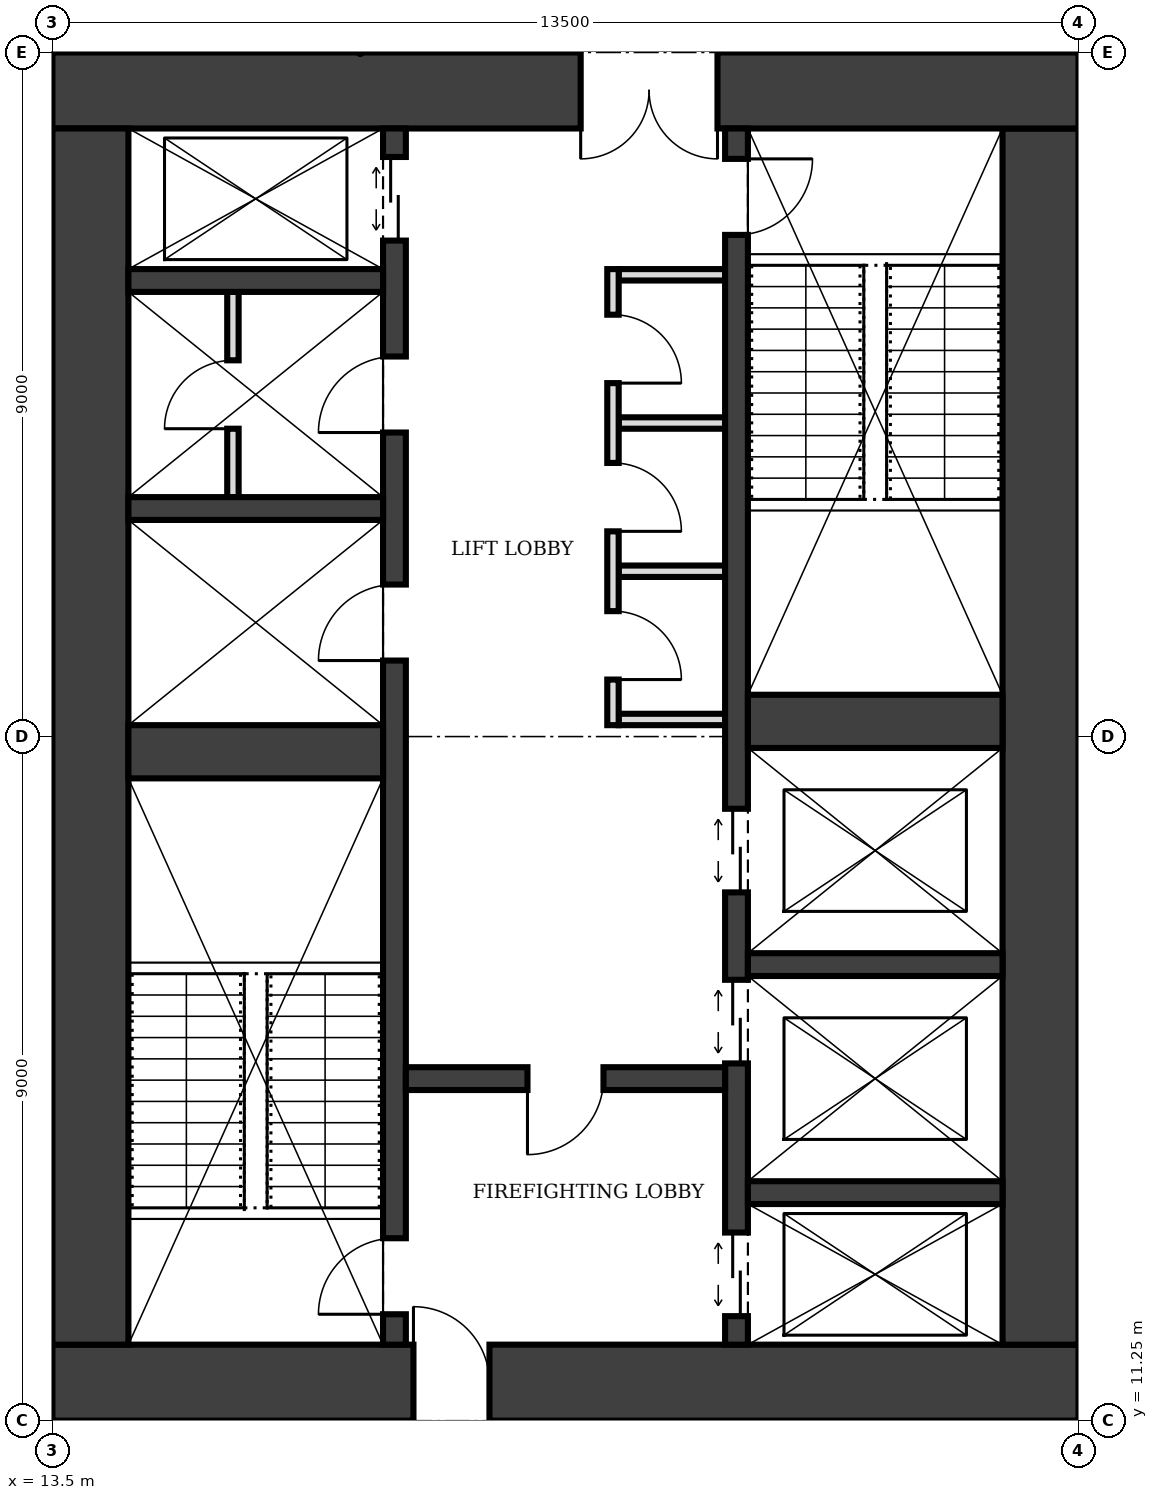
"""IFC4 building model, lengths in metres.
Left out: names, types, materials, properties, quantities, classifications, styles, units other than length and angle.
Written with IfcOpenShell. Run it as: python <this file> out.ifc"""

import sys

from ifc_helpers import new_model, si_unit, direction, frame, frame_2d, origin, place, context, subcontext, project, spatial, rectangle, extrude, element, fill, save


model = new_model("IFC4")
c1 = context("Model", 3, precision=1e-05, world=origin(), true_north=direction((0.0, 1.0)))
c2 = subcontext(c1, "Body", "Model", "MODEL_VIEW")
j1 = project(units=[si_unit("LENGTHUNIT", "METRE"), si_unit("PLANEANGLEUNIT", "RADIAN")], contexts=[c1])
p1 = place(None, origin())
s1 = spatial("IfcSite", under=j1, at=p1, CompositionType="ELEMENT")
p2 = place(p1, origin())
s2 = spatial("IfcBuilding", under=s1, at=p2, CompositionType="ELEMENT")
p3 = place(p2, frame((0.0, 0.0, 217.0)))
s3 = spatial("IfcBuildingStorey", under=s2, at=p3, CompositionType="ELEMENT", Elevation=217.0)
p4 = place(p3, frame((13.5, 11.75, 0.0), z_axis=(0.0, 0.0, 1.0), x_axis=(1.0, 0.0, 0.0)))
e1 = element("IfcWall", 1, at=p4, inside=s3, PredefinedType="SHEAR", context=c2, shape_type="SweptSolid", body=[
    extrude(rectangle(XDim=13.5, YDim=1.0, at=frame_2d((6.75, 0.0))), origin(), (0.0, 0.0, 1.0), 4.0),
])
p5 = place(p4, frame((4.75, 0.0, 0.0)))
e2 = element("IfcOpeningElement", 2, at=p5, cuts=e1, PredefinedType="OPENING", context=c2, shape_type="SweptSolid", body=[
    extrude(rectangle(XDim=1.0, YDim=2.1, at=frame_2d((0.5, 1.05))), frame((0.0, 0.51, 0.0), z_axis=(0.0, -1.0, 0.0), x_axis=(1.0, 0.0, 0.0)), (0.0, 0.0, 1.0), 1.02),
])
p6 = place(p3, frame((26.5, 12.25, 0.0), z_axis=(0.0, 0.0, 1.0), x_axis=(0.0, 1.0, 0.0)))
e3 = element("IfcWall", 3, at=p6, inside=s3, PredefinedType="SHEAR", context=c2, shape_type="SweptSolid", body=[
    extrude(rectangle(XDim=16.0, YDim=1.0, at=frame_2d((8.0, 0.0))), origin(), (0.0, 0.0, 1.0), 4.0),
])
p7 = place(p3, frame((27.0, 28.75, 0.0), z_axis=(0.0, 0.0, 1.0), x_axis=(-1.0, 0.0, 0.0)))
e4 = element("IfcWall", 4, at=p7, inside=s3, PredefinedType="SHEAR", context=c2, shape_type="SweptSolid", body=[
    extrude(rectangle(XDim=13.5, YDim=1.0, at=frame_2d((6.75, 0.0))), origin(), (0.0, 0.0, 1.0), 4.0),
])
p8 = place(p7, frame((4.75, 0.0, 0.0)))
e5 = element("IfcOpeningElement", 5, at=p8, cuts=e4, PredefinedType="OPENING", context=c2, shape_type="SweptSolid", body=[
    extrude(rectangle(XDim=1.8, YDim=2.1, at=frame_2d((0.9, 1.05))), frame((0.0, 0.51, 0.0), z_axis=(0.0, -1.0, 0.0), x_axis=(1.0, 0.0, 0.0)), (0.0, 0.0, 1.0), 1.02),
])
p9 = place(p3, frame((14.0, 28.25, 0.0), z_axis=(0.0, 0.0, 1.0), x_axis=(0.0, -1.0, 0.0)))
e6 = element("IfcWall", 6, at=p9, inside=s3, PredefinedType="SHEAR", context=c2, shape_type="SweptSolid", body=[
    extrude(rectangle(XDim=16.0, YDim=1.0, at=frame_2d((8.0, 0.0))), origin(), (0.0, 0.0, 1.0), 4.0),
])
p10 = place(p3, frame((18.0, 12.25, 0.0), z_axis=(0.0, 0.0, 1.0), x_axis=(0.0, 1.0, 0.0)))
e7 = element("IfcWall", 7, at=p10, inside=s3, PredefinedType="SHEAR", context=c2, shape_type="SweptSolid", body=[
    extrude(rectangle(XDim=16.0, YDim=0.3, at=frame_2d((8.0, 0.0))), origin(), (0.0, 0.0, 1.0), 4.0),
])
p11 = place(p10, frame((0.4, 0.0, 0.0)))
e8 = element("IfcOpeningElement", 8, at=p11, cuts=e7, PredefinedType="OPENING", context=c2, shape_type="SweptSolid", body=[
    extrude(rectangle(XDim=1.0, YDim=2.1, at=frame_2d((0.5, 1.05))), frame((0.0, 0.16, 0.0), z_axis=(0.0, -1.0, 0.0), x_axis=(1.0, 0.0, 0.0)), (0.0, 0.0, 1.0), 0.32),
])
p12 = place(p10, frame((14.525, 0.0, 0.0)))
e9 = element("IfcOpeningElement", 9, at=p12, cuts=e7, PredefinedType="OPENING", context=c2, shape_type="SweptSolid", body=[
    extrude(rectangle(XDim=1.1, YDim=2.1, at=frame_2d((0.55, 1.05))), frame((0.0, 0.16, 0.0), z_axis=(0.0, -1.0, 0.0), x_axis=(1.0, 0.0, 0.0)), (0.0, 0.0, 1.0), 0.32),
])
p13 = place(p10, frame((9.0, 0.0, 0.0)))
e10 = element("IfcOpeningElement", 10, at=p13, cuts=e7, PredefinedType="OPENING", context=c2, shape_type="SweptSolid", body=[
    extrude(rectangle(XDim=1.0, YDim=2.1, at=frame_2d((0.5, 1.05))), frame((0.0, 0.16, 0.0), z_axis=(0.0, -1.0, 0.0), x_axis=(1.0, 0.0, 0.0)), (0.0, 0.0, 1.0), 0.32),
])
p14 = place(p10, frame((12.0, 0.0, 0.0)))
e11 = element("IfcOpeningElement", 11, at=p14, cuts=e7, PredefinedType="OPENING", context=c2, shape_type="SweptSolid", body=[
    extrude(rectangle(XDim=1.0, YDim=2.1, at=frame_2d((0.5, 1.05))), frame((0.0, 0.16, 0.0), z_axis=(0.0, -1.0, 0.0), x_axis=(1.0, 0.0, 0.0)), (0.0, 0.0, 1.0), 0.32),
])
p15 = place(p3, frame((22.5, 12.25, 0.0), z_axis=(0.0, 0.0, 1.0), x_axis=(0.0, 1.0, 0.0)))
e12 = element("IfcWall", 12, at=p15, inside=s3, PredefinedType="SHEAR", context=c2, shape_type="SweptSolid", body=[
    extrude(rectangle(XDim=16.0, YDim=0.3, at=frame_2d((8.0, 0.0))), origin(), (0.0, 0.0, 1.0), 4.0),
])
p16 = place(p15, frame((14.6, 0.0, 0.0)))
e13 = element("IfcOpeningElement", 13, at=p16, cuts=e12, PredefinedType="OPENING", context=c2, shape_type="SweptSolid", body=[
    extrude(rectangle(XDim=1.0, YDim=2.1, at=frame_2d((0.5, 1.05))), frame((0.0, 0.16, 0.0), z_axis=(0.0, -1.0, 0.0), x_axis=(1.0, 0.0, 0.0)), (0.0, 0.0, 1.0), 0.32),
])
p17 = place(p15, frame((0.375, 0.0, 0.0)))
e14 = element("IfcOpeningElement", 14, at=p17, cuts=e12, PredefinedType="OPENING", context=c2, shape_type="SweptSolid", body=[
    extrude(rectangle(XDim=1.1, YDim=2.1, at=frame_2d((0.55, 1.05))), frame((0.0, 0.16, 0.0), z_axis=(0.0, -1.0, 0.0), x_axis=(1.0, 0.0, 0.0)), (0.0, 0.0, 1.0), 0.32),
])
p18 = place(p15, frame((3.7, 0.0, 0.0)))
e15 = element("IfcOpeningElement", 15, at=p18, cuts=e12, PredefinedType="OPENING", context=c2, shape_type="SweptSolid", body=[
    extrude(rectangle(XDim=1.1, YDim=2.1, at=frame_2d((0.55, 1.05))), frame((0.0, 0.16, 0.0), z_axis=(0.0, -1.0, 0.0), x_axis=(1.0, 0.0, 0.0)), (0.0, 0.0, 1.0), 0.32),
])
p19 = place(p15, frame((5.95, 0.0, 0.0)))
e16 = element("IfcOpeningElement", 16, at=p19, cuts=e12, PredefinedType="OPENING", context=c2, shape_type="SweptSolid", body=[
    extrude(rectangle(XDim=1.1, YDim=2.1, at=frame_2d((0.55, 1.05))), frame((0.0, 0.16, 0.0), z_axis=(0.0, -1.0, 0.0), x_axis=(1.0, 0.0, 0.0)), (0.0, 0.0, 1.0), 0.32),
])
p20 = place(p3, frame((14.5, 20.05, 0.0), z_axis=(0.0, 0.0, 1.0), x_axis=(1.0, 0.0, 0.0)))
e17 = element("IfcWall", 17, at=p20, inside=s3, PredefinedType="SHEAR", context=c2, shape_type="SweptSolid", body=[
    extrude(rectangle(XDim=3.35, YDim=0.7, at=frame_2d((1.675, 0.0))), origin(), (0.0, 0.0, 1.0), 4.0),
])
p21 = place(p3, frame((18.15, 15.75, 0.0), z_axis=(0.0, 0.0, 1.0), x_axis=(1.0, 0.0, 0.0)))
e18 = element("IfcWall", 18, at=p21, inside=s3, PredefinedType="SHEAR", context=c2, shape_type="SweptSolid", body=[
    extrude(rectangle(XDim=4.2, YDim=0.3, at=frame_2d((2.1, 0.0))), origin(), (0.0, 0.0, 1.0), 4.0),
])
p22 = place(p21, frame((1.6, 0.0, 0.0)))
e19 = element("IfcOpeningElement", 19, at=p22, cuts=e18, PredefinedType="OPENING", context=c2, shape_type="SweptSolid", body=[
    extrude(rectangle(XDim=1.0, YDim=2.1, at=frame_2d((0.5, 1.05))), frame((0.0, 0.16, 0.0), z_axis=(0.0, -1.0, 0.0), x_axis=(1.0, 0.0, 0.0)), (0.0, 0.0, 1.0), 0.32),
])
for number, where, z_axis, x_axis in (
    (20, (22.65, 14.25, 0.0), (0.0, 0.0, 1.0), (1.0, 0.0, 0.0)),
    (21, (22.65, 17.25, 0.0), (0.0, 0.0, 1.0), (1.0, 0.0, 0.0)),
):
    element("IfcWall", number, at=place(p3, frame(where, z_axis=z_axis, x_axis=x_axis)), inside=s3, PredefinedType="SHEAR", context=c2, shape_type="SweptSolid", body=[
        extrude(rectangle(XDim=3.35, YDim=0.3, at=frame_2d((1.675, 0.0))), origin(), (0.0, 0.0, 1.0), 4.0),
    ])
p23 = place(p3, frame((22.65, 20.45, 0.0), z_axis=(0.0, 0.0, 1.0), x_axis=(1.0, 0.0, 0.0)))
e22 = element("IfcWall", 22, at=p23, inside=s3, PredefinedType="SHEAR", context=c2, shape_type="SweptSolid", body=[
    extrude(rectangle(XDim=3.35, YDim=0.7, at=frame_2d((1.675, 0.0))), origin(), (0.0, 0.0, 1.0), 4.0),
])
for number, where, z_axis, x_axis in (
    (23, (14.5, 23.25, 0.0), (0.0, 0.0, 1.0), (1.0, 0.0, 0.0)),
    (24, (14.5, 26.25, 0.0), (0.0, 0.0, 1.0), (1.0, 0.0, 0.0)),
):
    element("IfcWall", number, at=place(p3, frame(where, z_axis=z_axis, x_axis=x_axis)), inside=s3, PredefinedType="SHEAR", context=c2, shape_type="SweptSolid", body=[
        extrude(rectangle(XDim=3.35, YDim=0.3, at=frame_2d((1.675, 0.0))), origin(), (0.0, 0.0, 1.0), 4.0),
    ])
p24 = place(p3, frame((20.875, 20.4, 0.0), z_axis=(0.0, 0.0, 1.0), x_axis=(0.0, 1.0, 0.0)))
e25 = element("IfcWall", 25, at=p24, inside=s3, PredefinedType="PARTITIONING", context=c2, shape_type="SweptSolid", body=[
    extrude(rectangle(XDim=6.0, YDim=0.15, at=frame_2d((3.0, 0.0))), origin(), (0.0, 0.0, 1.0), 3.75),
])
p25 = place(p24, frame((0.6, 0.0, 0.0)))
e26 = element("IfcOpeningElement", 26, at=p25, cuts=e25, PredefinedType="OPENING", context=c2, shape_type="SweptSolid", body=[
    extrude(rectangle(XDim=0.9, YDim=2.1, at=frame_2d((0.45, 1.05))), frame((0.0, 0.085, 0.0), z_axis=(0.0, -1.0, 0.0), x_axis=(1.0, 0.0, 0.0)), (0.0, 0.0, 1.0), 0.17),
])
p26 = place(p24, frame((2.55, 0.0, 0.0)))
e27 = element("IfcOpeningElement", 27, at=p26, cuts=e25, PredefinedType="OPENING", context=c2, shape_type="SweptSolid", body=[
    extrude(rectangle(XDim=0.9, YDim=2.1, at=frame_2d((0.45, 1.05))), frame((0.0, 0.085, 0.0), z_axis=(0.0, -1.0, 0.0), x_axis=(1.0, 0.0, 0.0)), (0.0, 0.0, 1.0), 0.17),
])
p27 = place(p24, frame((4.5, 0.0, 0.0)))
e28 = element("IfcOpeningElement", 28, at=p27, cuts=e25, PredefinedType="OPENING", context=c2, shape_type="SweptSolid", body=[
    extrude(rectangle(XDim=0.9, YDim=2.1, at=frame_2d((0.45, 1.05))), frame((0.0, 0.085, 0.0), z_axis=(0.0, -1.0, 0.0), x_axis=(1.0, 0.0, 0.0)), (0.0, 0.0, 1.0), 0.17),
])
for number, where, z_axis, x_axis in (
    (29, (20.95, 20.475, 0.0), (0.0, 0.0, 1.0), (1.0, 0.0, 0.0)),
    (30, (20.95, 22.425, 0.0), (0.0, 0.0, 1.0), (1.0, 0.0, 0.0)),
    (31, (20.95, 24.375, 0.0), (0.0, 0.0, 1.0), (1.0, 0.0, 0.0)),
    (32, (20.95, 26.325, 0.0), (0.0, 0.0, 1.0), (1.0, 0.0, 0.0)),
):
    element("IfcWall", number, at=place(p3, frame(where, z_axis=z_axis, x_axis=x_axis)), inside=s3, PredefinedType="PARTITIONING", context=c2, shape_type="SweptSolid", body=[
        extrude(rectangle(XDim=1.4, YDim=0.15, at=frame_2d((0.7, 0.0))), origin(), (0.0, 0.0, 1.0), 3.75),
    ])
p28 = place(p3, frame((15.875, 23.4, 0.0), z_axis=(0.0, 0.0, 1.0), x_axis=(0.0, 1.0, 0.0)))
e33 = element("IfcWall", 33, at=p28, inside=s3, PredefinedType="PARTITIONING", context=c2, shape_type="SweptSolid", body=[
    extrude(rectangle(XDim=2.7, YDim=0.15, at=frame_2d((1.35, 0.0))), origin(), (0.0, 0.0, 1.0), 3.75),
])
p29 = place(p28, frame((0.9, 0.0, 0.0)))
e34 = element("IfcOpeningElement", 34, at=p29, cuts=e33, PredefinedType="OPENING", context=c2, shape_type="SweptSolid", body=[
    extrude(rectangle(XDim=0.9, YDim=2.1, at=frame_2d((0.45, 1.05))), frame((0.0, 0.085, 0.0), z_axis=(0.0, -1.0, 0.0), x_axis=(1.0, 0.0, 0.0)), (0.0, 0.0, 1.0), 0.17),
])
p30 = place(p5, origin())
e35 = element("IfcDoor", 35, at=p30, inside=s3, OperationType="SINGLE_SWING_LEFT", PredefinedType="DOOR", context=c2, shape_type="SweptSolid", body=[
    extrude(rectangle(XDim=1.0, YDim=2.1, at=frame_2d((0.5, 1.05))), frame((0.0, 0.025, 0.0), z_axis=(0.0, -1.0, 0.0), x_axis=(1.0, 0.0, 0.0)), (0.0, 0.0, 1.0), 0.05),
])
fill(e2, e35)
p31 = place(p8, origin())
e36 = element("IfcDoor", 36, at=p31, inside=s3, OperationType="DOUBLE_DOOR_SINGLE_SWING", PredefinedType="DOOR", context=c2, shape_type="SweptSolid", body=[
    extrude(rectangle(XDim=1.8, YDim=2.1, at=frame_2d((0.9, 1.05))), frame((0.0, 0.025, 0.0), z_axis=(0.0, -1.0, 0.0), x_axis=(1.0, 0.0, 0.0)), (0.0, 0.0, 1.0), 0.05),
])
fill(e5, e36)
p32 = place(p22, frame((1.0, 0.0, 0.0), z_axis=(0.0, 0.0, 1.0), x_axis=(-1.0, 0.0, 0.0)))
e37 = element("IfcDoor", 37, at=p32, inside=s3, OperationType="SINGLE_SWING_RIGHT", PredefinedType="DOOR", context=c2, shape_type="SweptSolid", body=[
    extrude(rectangle(XDim=1.0, YDim=2.1, at=frame_2d((0.5, 1.05))), frame((0.0, 0.025, 0.0), z_axis=(0.0, -1.0, 0.0), x_axis=(1.0, 0.0, 0.0)), (0.0, 0.0, 1.0), 0.05),
])
fill(e19, e37)
p33 = place(p11, origin())
e38 = element("IfcDoor", 38, at=p33, inside=s3, OperationType="SINGLE_SWING_LEFT", PredefinedType="DOOR", context=c2, shape_type="SweptSolid", body=[
    extrude(rectangle(XDim=1.0, YDim=2.1, at=frame_2d((0.5, 1.05))), frame((0.0, 0.025, 0.0), z_axis=(0.0, -1.0, 0.0), x_axis=(1.0, 0.0, 0.0)), (0.0, 0.0, 1.0), 0.05),
])
fill(e8, e38)
p34 = place(p16, frame((1.0, 0.0, 0.0), z_axis=(0.0, 0.0, 1.0), x_axis=(-1.0, 0.0, 0.0)))
e39 = element("IfcDoor", 39, at=p34, inside=s3, OperationType="SINGLE_SWING_LEFT", PredefinedType="DOOR", context=c2, shape_type="SweptSolid", body=[
    extrude(rectangle(XDim=1.0, YDim=2.1, at=frame_2d((0.5, 1.05))), frame((0.0, 0.025, 0.0), z_axis=(0.0, -1.0, 0.0), x_axis=(1.0, 0.0, 0.0)), (0.0, 0.0, 1.0), 0.05),
])
fill(e13, e39)
p35 = place(p17, origin())
e40 = element("IfcDoor", 40, at=p35, inside=s3, OperationType="DOUBLE_DOOR_SLIDING", PredefinedType="DOOR", context=c2, shape_type="SweptSolid", body=[
    extrude(rectangle(XDim=1.1, YDim=2.1, at=frame_2d((0.55, 1.05))), frame((0.0, 0.025, 0.0), z_axis=(0.0, -1.0, 0.0), x_axis=(1.0, 0.0, 0.0)), (0.0, 0.0, 1.0), 0.05),
])
fill(e14, e40)
p36 = place(p12, origin())
e41 = element("IfcDoor", 41, at=p36, inside=s3, OperationType="DOUBLE_DOOR_SLIDING", PredefinedType="DOOR", context=c2, shape_type="SweptSolid", body=[
    extrude(rectangle(XDim=1.1, YDim=2.1, at=frame_2d((0.55, 1.05))), frame((0.0, 0.025, 0.0), z_axis=(0.0, -1.0, 0.0), x_axis=(1.0, 0.0, 0.0)), (0.0, 0.0, 1.0), 0.05),
])
fill(e9, e41)
p37 = place(p18, origin())
e42 = element("IfcDoor", 42, at=p37, inside=s3, OperationType="DOUBLE_DOOR_SLIDING", PredefinedType="DOOR", context=c2, shape_type="SweptSolid", body=[
    extrude(rectangle(XDim=1.1, YDim=2.1, at=frame_2d((0.55, 1.05))), frame((0.0, 0.025, 0.0), z_axis=(0.0, -1.0, 0.0), x_axis=(1.0, 0.0, 0.0)), (0.0, 0.0, 1.0), 0.05),
])
fill(e15, e42)
p38 = place(p19, origin())
e43 = element("IfcDoor", 43, at=p38, inside=s3, OperationType="DOUBLE_DOOR_SLIDING", PredefinedType="DOOR", context=c2, shape_type="SweptSolid", body=[
    extrude(rectangle(XDim=1.1, YDim=2.1, at=frame_2d((0.55, 1.05))), frame((0.0, 0.025, 0.0), z_axis=(0.0, -1.0, 0.0), x_axis=(1.0, 0.0, 0.0)), (0.0, 0.0, 1.0), 0.05),
])
fill(e16, e43)
p39 = place(p25, frame((0.9, 0.0, 0.0), z_axis=(0.0, 0.0, 1.0), x_axis=(-1.0, 0.0, 0.0)))
e44 = element("IfcDoor", 44, at=p39, inside=s3, OperationType="SINGLE_SWING_RIGHT", PredefinedType="DOOR", context=c2, shape_type="SweptSolid", body=[
    extrude(rectangle(XDim=0.9, YDim=2.1, at=frame_2d((0.45, 1.05))), frame((0.0, 0.025, 0.0), z_axis=(0.0, -1.0, 0.0), x_axis=(1.0, 0.0, 0.0)), (0.0, 0.0, 1.0), 0.05),
])
fill(e26, e44)
p40 = place(p26, frame((0.9, 0.0, 0.0), z_axis=(0.0, 0.0, 1.0), x_axis=(-1.0, 0.0, 0.0)))
e45 = element("IfcDoor", 45, at=p40, inside=s3, OperationType="SINGLE_SWING_RIGHT", PredefinedType="DOOR", context=c2, shape_type="SweptSolid", body=[
    extrude(rectangle(XDim=0.9, YDim=2.1, at=frame_2d((0.45, 1.05))), frame((0.0, 0.025, 0.0), z_axis=(0.0, -1.0, 0.0), x_axis=(1.0, 0.0, 0.0)), (0.0, 0.0, 1.0), 0.05),
])
fill(e27, e45)
p41 = place(p27, frame((0.9, 0.0, 0.0), z_axis=(0.0, 0.0, 1.0), x_axis=(-1.0, 0.0, 0.0)))
e46 = element("IfcDoor", 46, at=p41, inside=s3, OperationType="SINGLE_SWING_RIGHT", PredefinedType="DOOR", context=c2, shape_type="SweptSolid", body=[
    extrude(rectangle(XDim=0.9, YDim=2.1, at=frame_2d((0.45, 1.05))), frame((0.0, 0.025, 0.0), z_axis=(0.0, -1.0, 0.0), x_axis=(1.0, 0.0, 0.0)), (0.0, 0.0, 1.0), 0.05),
])
fill(e28, e46)
p42 = place(p13, origin())
e47 = element("IfcDoor", 47, at=p42, inside=s3, OperationType="SINGLE_SWING_LEFT", PredefinedType="DOOR", context=c2, shape_type="SweptSolid", body=[
    extrude(rectangle(XDim=1.0, YDim=2.1, at=frame_2d((0.5, 1.05))), frame((0.0, 0.025, 0.0), z_axis=(0.0, -1.0, 0.0), x_axis=(1.0, 0.0, 0.0)), (0.0, 0.0, 1.0), 0.05),
])
fill(e10, e47)
p43 = place(p14, origin())
e48 = element("IfcDoor", 48, at=p43, inside=s3, OperationType="SINGLE_SWING_LEFT", PredefinedType="DOOR", context=c2, shape_type="SweptSolid", body=[
    extrude(rectangle(XDim=1.0, YDim=2.1, at=frame_2d((0.5, 1.05))), frame((0.0, 0.025, 0.0), z_axis=(0.0, -1.0, 0.0), x_axis=(1.0, 0.0, 0.0)), (0.0, 0.0, 1.0), 0.05),
])
fill(e11, e48)
p44 = place(p29, origin())
e49 = element("IfcDoor", 49, at=p44, inside=s3, OperationType="SINGLE_SWING_LEFT", PredefinedType="DOOR", context=c2, shape_type="SweptSolid", body=[
    extrude(rectangle(XDim=0.9, YDim=2.1, at=frame_2d((0.45, 1.05))), frame((0.0, 0.025, 0.0), z_axis=(0.0, -1.0, 0.0), x_axis=(1.0, 0.0, 0.0)), (0.0, 0.0, 1.0), 0.05),
])
fill(e34, e49)
save(model, sys.argv[1])
